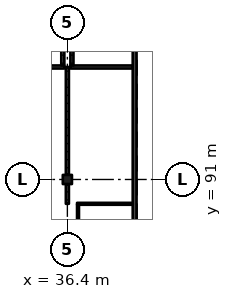
"""IFC4 building model, lengths in metres.
Left out: names, types, materials, properties, quantities, classifications, styles, units other than length and angle.
Written with IfcOpenShell. Run it as: python <this file> out.ifc"""

import sys

from ifc_helpers import new_model, si_unit, direction, frame, frame_2d, origin, origin_2d, place, context, subcontext, project, spatial, rectangle, extrude, element, fill, save


model = new_model("IFC4")
c1 = context("Model", 3, precision=1e-05, world=origin(), true_north=direction((0.0, 1.0)))
c2 = subcontext(c1, "Body", "Model", "MODEL_VIEW")
j1 = project(units=[si_unit("LENGTHUNIT", "METRE"), si_unit("PLANEANGLEUNIT", "RADIAN")], contexts=[c1])
p1 = place(None, origin())
s1 = spatial("IfcSite", under=j1, at=p1, CompositionType="ELEMENT")
p2 = place(p1, origin())
s2 = spatial("IfcBuilding", under=s1, at=p2, CompositionType="ELEMENT")
p3 = place(p2, frame((0.0, 0.0, 20.02)))
s3 = spatial("IfcBuildingStorey", under=s2, at=p3, CompositionType="ELEMENT", Elevation=20.02)
p4 = place(p3, frame((36.4, 91.0, 0.0), z_axis=(0.0, 0.0, 1.0), x_axis=(1.0, 0.0, 0.0)))
e1 = element("IfcColumn", 1, at=p4, inside=s3, PredefinedType="COLUMN", context=c2, shape_type="SweptSolid", body=[
    extrude(rectangle(XDim=0.6, YDim=0.6, at=origin_2d()), origin(), (0.0, 0.0, 1.0), 4.55),
])
p5 = place(p3, frame((40.825, 68.25, 0.0), z_axis=(0.0, 0.0, 1.0), x_axis=(0.0, 1.0, 0.0)))
e2 = element("IfcWall", 2, at=p5, inside=s3, PredefinedType="SHEAR", context=c2, shape_type="SweptSolid", body=[
    extrude(rectangle(XDim=31.85, YDim=0.25, at=frame_2d((15.925, 0.0))), origin(), (0.0, 0.0, 1.0), 4.55),
])
p6 = place(p3, frame((33.43, 98.4, 0.0), z_axis=(0.0, 0.0, 1.0), x_axis=(1.0, 0.0, 0.0)))
e3 = element("IfcWall", 3, at=p6, inside=s3, PredefinedType="PARTITIONING", context=c2, shape_type="SweptSolid", body=[
    extrude(rectangle(XDim=2.77, YDim=0.2, at=frame_2d((1.385, 0.0))), origin(), (0.0, 0.0, 1.0), 4.25),
])
p7 = place(p6, frame((0.45, 0.0, 0.0)))
e4 = element("IfcOpeningElement", 4, at=p7, cuts=e3, PredefinedType="OPENING", context=c2, shape_type="SweptSolid", body=[
    extrude(rectangle(XDim=1.8, YDim=2.4, at=frame_2d((0.9, 1.2))), frame((0.0, 0.11, 0.0), z_axis=(0.0, -1.0, 0.0), x_axis=(1.0, 0.0, 0.0)), (0.0, 0.0, 1.0), 0.22),
])
p8 = place(p3, frame((36.1, 98.5, 0.0), z_axis=(0.0, 0.0, 1.0), x_axis=(0.0, 1.0, 0.0)))
e5 = element("IfcWall", 5, at=p8, inside=s3, PredefinedType="PARTITIONING", context=c2, shape_type="SweptSolid", body=[
    extrude(rectangle(XDim=1.3, YDim=0.2, at=frame_2d((0.65, 0.0))), origin(), (0.0, 0.0, 1.0), 4.25),
])
p9 = place(p3, frame((36.4, 90.7, 0.0), z_axis=(0.0, 0.0, 1.0), x_axis=(0.0, -1.0, 0.0)))
e6 = element("IfcWall", 6, at=p9, inside=s3, PredefinedType="PARTITIONING", context=c2, shape_type="SweptSolid", body=[
    extrude(rectangle(XDim=1.3, YDim=0.2, at=frame_2d((0.65, 0.0))), origin(), (0.0, 0.0, 1.0), 3.5),
])
p10 = place(p3, frame((36.4, 98.4, 0.0), z_axis=(0.0, 0.0, 1.0), x_axis=(0.0, -1.0, 0.0)))
e7 = element("IfcWall", 7, at=p10, inside=s3, PredefinedType="PARTITIONING", context=c2, shape_type="SweptSolid", body=[
    extrude(rectangle(XDim=7.1, YDim=0.2, at=frame_2d((3.55, 0.0))), origin(), (0.0, 0.0, 1.0), 3.5),
])
p11 = place(p10, frame((0.85, 0.0, 0.0)))
e8 = element("IfcOpeningElement", 8, at=p11, cuts=e7, PredefinedType="OPENING", context=c2, shape_type="SweptSolid", body=[
    extrude(rectangle(XDim=1.8, YDim=2.4, at=frame_2d((0.9, 1.2))), frame((0.0, 0.11, 0.0), z_axis=(0.0, -1.0, 0.0), x_axis=(1.0, 0.0, 0.0)), (0.0, 0.0, 1.0), 0.22),
])
p12 = place(p10, frame((4.45, 0.0, 0.0)))
e9 = element("IfcOpeningElement", 9, at=p12, cuts=e7, PredefinedType="OPENING", context=c2, shape_type="SweptSolid", body=[
    extrude(rectangle(XDim=1.8, YDim=2.4, at=frame_2d((0.9, 1.2))), frame((0.0, 0.11, 0.0), z_axis=(0.0, -1.0, 0.0), x_axis=(1.0, 0.0, 0.0)), (0.0, 0.0, 1.0), 0.22),
])
p13 = place(p3, frame((36.6, 98.4, 0.0), z_axis=(0.0, 0.0, 1.0), x_axis=(1.0, 0.0, 0.0)))
e10 = element("IfcWall", 10, at=p13, inside=s3, PredefinedType="PARTITIONING", context=c2, shape_type="SweptSolid", body=[
    extrude(rectangle(XDim=4.1, YDim=0.2, at=frame_2d((2.05, 0.0))), origin(), (0.0, 0.0, 1.0), 4.25),
])
p14 = place(p13, frame((1.15, 0.0, 0.0)))
e11 = element("IfcOpeningElement", 11, at=p14, cuts=e10, PredefinedType="OPENING", context=c2, shape_type="SweptSolid", body=[
    extrude(rectangle(XDim=1.8, YDim=2.4, at=frame_2d((0.9, 1.2))), frame((0.0, 0.11, 0.0), z_axis=(0.0, -1.0, 0.0), x_axis=(1.0, 0.0, 0.0)), (0.0, 0.0, 1.0), 0.22),
])
p15 = place(p3, frame((36.7, 99.8, 0.0), z_axis=(0.0, 0.0, 1.0), x_axis=(0.0, -1.0, 0.0)))
e12 = element("IfcWall", 12, at=p15, inside=s3, PredefinedType="PARTITIONING", context=c2, shape_type="SweptSolid", body=[
    extrude(rectangle(XDim=1.3, YDim=0.2, at=frame_2d((0.65, 0.0))), origin(), (0.0, 0.0, 1.0), 4.25),
])
p16 = place(p3, frame((37.1, 89.337, 0.0), z_axis=(0.0, 0.0, 1.0), x_axis=(0.0, -1.0, 0.0)))
e13 = element("IfcWall", 13, at=p16, inside=s3, PredefinedType="PARTITIONING", context=c2, shape_type="SweptSolid", body=[
    extrude(rectangle(XDim=7.075, YDim=0.125, at=frame_2d((3.538, 0.0))), origin(), (0.0, 0.0, 1.0), 4.25),
])
p17 = place(p3, frame((40.7, 89.4, 0.0), z_axis=(0.0, 0.0, 1.0), x_axis=(-1.0, 0.0, 0.0)))
e14 = element("IfcWall", 14, at=p17, inside=s3, PredefinedType="PARTITIONING", context=c2, shape_type="SweptSolid", body=[
    extrude(rectangle(XDim=3.662, YDim=0.125, at=frame_2d((1.831, 0.0))), origin(), (0.0, 0.0, 1.0), 4.25),
])
p18 = place(p17, frame((1.35, 0.0, 0.0)))
e15 = element("IfcOpeningElement", 15, at=p18, cuts=e14, PredefinedType="OPENING", context=c2, shape_type="SweptSolid", body=[
    extrude(rectangle(XDim=0.9, YDim=2.1, at=frame_2d((0.45, 1.05))), frame((0.0, 0.073, 0.0), z_axis=(0.0, -1.0, 0.0), x_axis=(1.0, 0.0, 0.0)), (0.0, 0.0, 1.0), 0.145),
])
p19 = place(p18, origin())
e16 = element("IfcDoor", 16, at=p19, inside=s3, OperationType="SINGLE_SWING_RIGHT", PredefinedType="DOOR", context=c2, shape_type="SweptSolid", body=[
    extrude(rectangle(XDim=0.9, YDim=2.1, at=frame_2d((0.45, 1.05))), frame((0.0, 0.025, 0.0), z_axis=(0.0, -1.0, 0.0), x_axis=(1.0, 0.0, 0.0)), (0.0, 0.0, 1.0), 0.05),
])
fill(e15, e16)
p20 = place(p11, origin())
e17 = element("IfcDoor", 17, at=p20, inside=s3, OperationType="DOUBLE_DOOR_SINGLE_SWING", PredefinedType="DOOR", context=c2, shape_type="SweptSolid", body=[
    extrude(rectangle(XDim=1.8, YDim=2.4, at=frame_2d((0.9, 1.2))), frame((0.0, 0.025, 0.0), z_axis=(0.0, -1.0, 0.0), x_axis=(1.0, 0.0, 0.0)), (0.0, 0.0, 1.0), 0.05),
])
fill(e8, e17)
p21 = place(p12, origin())
e18 = element("IfcDoor", 18, at=p21, inside=s3, OperationType="DOUBLE_DOOR_SINGLE_SWING", PredefinedType="DOOR", context=c2, shape_type="SweptSolid", body=[
    extrude(rectangle(XDim=1.8, YDim=2.4, at=frame_2d((0.9, 1.2))), frame((0.0, 0.025, 0.0), z_axis=(0.0, -1.0, 0.0), x_axis=(1.0, 0.0, 0.0)), (0.0, 0.0, 1.0), 0.05),
])
fill(e9, e18)
p22 = place(p7, origin())
e19 = element("IfcDoor", 19, at=p22, inside=s3, OperationType="DOUBLE_DOOR_SINGLE_SWING", PredefinedType="DOOR", context=c2, shape_type="SweptSolid", body=[
    extrude(rectangle(XDim=1.8, YDim=2.4, at=frame_2d((0.9, 1.2))), frame((0.0, 0.025, 0.0), z_axis=(0.0, -1.0, 0.0), x_axis=(1.0, 0.0, 0.0)), (0.0, 0.0, 1.0), 0.05),
])
fill(e4, e19)
p23 = place(p14, origin())
e20 = element("IfcDoor", 20, at=p23, inside=s3, OperationType="DOUBLE_DOOR_SINGLE_SWING", PredefinedType="DOOR", context=c2, shape_type="SweptSolid", body=[
    extrude(rectangle(XDim=1.8, YDim=2.4, at=frame_2d((0.9, 1.2))), frame((0.0, 0.025, 0.0), z_axis=(0.0, -1.0, 0.0), x_axis=(1.0, 0.0, 0.0)), (0.0, 0.0, 1.0), 0.05),
])
fill(e11, e20)
save(model, sys.argv[1])
